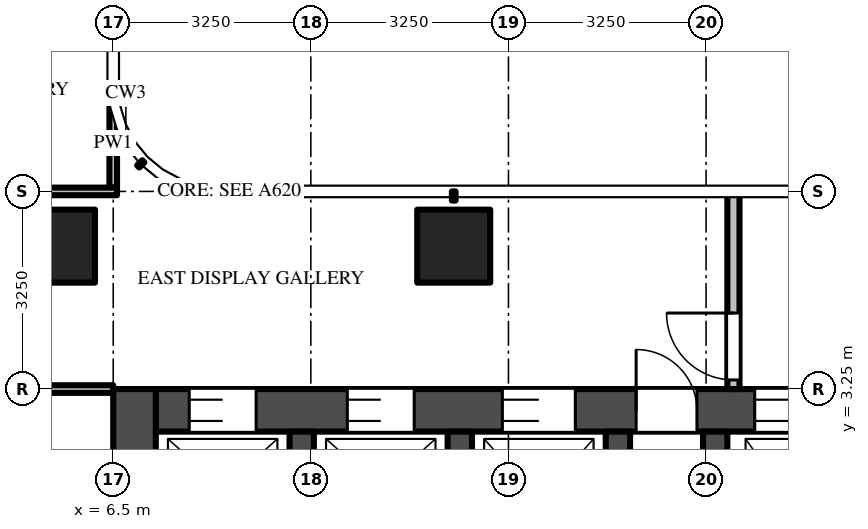
"""IFC4 building model, lengths in metres.
Left out: names, types, materials, properties, quantities, classifications, styles, units other than length and angle.
Written with IfcOpenShell. Run it as: python <this file> out.ifc"""

import sys

from ifc_helpers import new_model, si_unit, direction, frame, frame_2d, origin, origin_2d, place, context, subcontext, project, spatial, rectangle, extrude, source, transform, mapped, element, fill, save


model = new_model("IFC4")
c1 = context("Model", 3, precision=1e-05, world=origin(), true_north=direction((0.0, 1.0)))
c2 = subcontext(c1, "Body", "Model", "MODEL_VIEW")
j1 = project(units=[si_unit("LENGTHUNIT", "METRE"), si_unit("PLANEANGLEUNIT", "RADIAN")], contexts=[c1])
p1 = place(None, origin())
s1 = spatial("IfcSite", under=j1, at=p1, CompositionType="ELEMENT")
p2 = place(p1, origin())
s2 = spatial("IfcBuilding", under=s1, at=p2, CompositionType="ELEMENT")
p3 = place(p2, frame((0.0, 0.0, 169.8)))
s3 = spatial("IfcBuildingStorey", under=s2, at=p3, CompositionType="ELEMENT", Elevation=169.8)
m1 = source(origin(), c2, "Body", "SweptSolid", [
    extrude(rectangle(XDim=1.2, YDim=1.2, at=origin_2d()), origin(), (0.0, 0.0, 1.0), 3.9),
])
for number, where, z_axis, x_axis in (
    (1, (12.1, 5.6, 0.0), (0.0, 0.0, 1.0), (1.0, 0.0, 0.0)),
    (2, (5.6, 5.6, 0.0), (0.0, 0.0, 1.0), (1.0, 0.0, 0.0)),
):
    element("IfcColumn", number, at=place(p3, frame(where, z_axis=z_axis, x_axis=x_axis)), inside=s3, PredefinedType="COLUMN", context=c2, shape_type="MappedRepresentation", body=[
        mapped(m1, transform((0.0, 0.0, 0.0))),
    ])
m2 = source(origin(), c2, "Body", "SweptSolid", [
    extrude(rectangle(XDim=14.85, YDim=0.7, at=frame_2d((7.425, 0.0))), origin(), (0.0, 0.0, 1.0), 3.7),
])
p4 = place(p3, frame((7.2, 2.9, 0.0), z_axis=(0.0, 0.0, 1.0), x_axis=(1.0, 0.0, 0.0)))
e3 = element("IfcWall", 3, at=p4, inside=s3, PredefinedType="SHEAR", context=c2, shape_type="MappedRepresentation", body=[
    mapped(m2, transform((0.0, 0.0, 0.0))),
])
m3 = source(origin(), c2, "Body", "SweptSolid", [
    extrude(rectangle(XDim=1.1, YDim=2.1, at=frame_2d((0.55, 1.05))), frame((0.0, 0.36, 0.0), z_axis=(0.0, -1.0, 0.0), x_axis=(1.0, 0.0, 0.0)), (0.0, 0.0, 1.0), 0.72),
])
p5 = place(p4, frame((0.55, 0.0, 0.0)))
e4 = element("IfcOpeningElement", 4, at=p5, cuts=e3, PredefinedType="OPENING", context=c2, shape_type="MappedRepresentation", body=[
    mapped(m3, transform((0.0, 0.0, 0.0))),
])
p6 = place(p4, frame((3.15, 0.0, 0.0)))
e5 = element("IfcOpeningElement", 5, at=p6, cuts=e3, PredefinedType="OPENING", context=c2, shape_type="MappedRepresentation", body=[
    mapped(m3, transform((0.0, 0.0, 0.0))),
])
m4 = source(origin(), c2, "Body", "SweptSolid", [
    extrude(rectangle(XDim=1.2, YDim=2.1, at=frame_2d((0.6, 1.05))), frame((0.0, 0.36, 0.0), z_axis=(0.0, -1.0, 0.0), x_axis=(1.0, 0.0, 0.0)), (0.0, 0.0, 1.0), 0.72),
])
p7 = place(p4, frame((5.7, 0.0, 0.0)))
e6 = element("IfcOpeningElement", 6, at=p7, cuts=e3, PredefinedType="OPENING", context=c2, shape_type="MappedRepresentation", body=[
    mapped(m4, transform((0.0, 0.0, 0.0))),
])
m5 = source(origin(), c2, "Body", "SweptSolid", [
    extrude(rectangle(XDim=1.3, YDim=2.1, at=frame_2d((0.65, 1.05))), frame((0.0, 0.36, 0.0), z_axis=(0.0, -1.0, 0.0), x_axis=(1.0, 0.0, 0.0)), (0.0, 0.0, 1.0), 0.72),
])
p8 = place(p4, frame((12.2, 0.0, 0.0)))
e7 = element("IfcOpeningElement", 7, at=p8, cuts=e3, PredefinedType="OPENING", context=c2, shape_type="MappedRepresentation", body=[
    mapped(m5, transform((0.0, 0.0, 0.0))),
])
p9 = place(p4, frame((9.85, 0.0, 0.0)))
e8 = element("IfcOpeningElement", 8, at=p9, cuts=e3, PredefinedType="OPENING", context=c2, shape_type="MappedRepresentation", body=[
    mapped(m4, transform((0.0, 0.0, 0.0))),
])
m6 = source(origin(), c2, "Body", "SweptSolid", [
    extrude(rectangle(XDim=1.0, YDim=2.1, at=frame_2d((0.5, 1.05))), frame((0.0, 0.36, 0.0), z_axis=(0.0, -1.0, 0.0), x_axis=(1.0, 0.0, 0.0)), (0.0, 0.0, 1.0), 0.72),
])
p10 = place(p4, frame((7.9, 0.0, 0.0)))
e9 = element("IfcOpeningElement", 9, at=p10, cuts=e3, PredefinedType="OPENING", context=c2, shape_type="MappedRepresentation", body=[
    mapped(m6, transform((0.0, 0.0, 0.0))),
])
m7 = source(origin(), c2, "Body", "SweptSolid", [
    extrude(rectangle(XDim=9.05, YDim=0.7, at=frame_2d((4.525, 0.0))), origin(), (0.0, 0.0, 1.0), 3.7),
])
p11 = place(p3, frame((6.85, -5.8, 0.0), z_axis=(0.0, 0.0, 1.0), x_axis=(0.0, 1.0, 0.0)))
e10 = element("IfcWall", 10, at=p11, inside=s3, PredefinedType="SHEAR", context=c2, shape_type="MappedRepresentation", body=[
    mapped(m7, transform((0.0, 0.0, 0.0))),
])
m8 = source(origin(), c2, "Body", "SweptSolid", [
    extrude(rectangle(XDim=1.8, YDim=2.1, at=frame_2d((0.9, 1.05))), frame((0.0, 0.36, 0.0), z_axis=(0.0, -1.0, 0.0), x_axis=(1.0, 0.0, 0.0)), (0.0, 0.0, 1.0), 0.72),
])
p12 = place(p11, frame((3.15, 0.0, 0.0)))
e11 = element("IfcOpeningElement", 11, at=p12, cuts=e10, PredefinedType="OPENING", context=c2, shape_type="MappedRepresentation", body=[
    mapped(m8, transform((0.0, 0.0, 0.0))),
])
m9 = source(origin(), c2, "Body", "SweptSolid", [
    extrude(rectangle(XDim=2.45, YDim=0.4, at=frame_2d((1.225, 0.0))), origin(), (0.0, 0.0, 1.0), 3.7),
])
for number, where, z_axis, x_axis in (
    (12, (9.6, 0.1, 0.0), (0.0, 0.0, 1.0), (0.0, 1.0, 0.0)),
    (13, (12.2, 0.1, 0.0), (0.0, 0.0, 1.0), (0.0, 1.0, 0.0)),
    (14, (14.8, 0.1, 0.0), (0.0, 0.0, 1.0), (0.0, 1.0, 0.0)),
    (15, (16.4, 0.1, 0.0), (0.0, 0.0, 1.0), (0.0, 1.0, 0.0)),
):
    element("IfcWall", number, at=place(p3, frame(where, z_axis=z_axis, x_axis=x_axis)), inside=s3, PredefinedType="SHEAR", context=c2, shape_type="MappedRepresentation", body=[
        mapped(m9, transform((0.0, 0.0, 0.0))),
    ])
m10 = source(origin(), c2, "Body", "SweptSolid", [
    extrude(rectangle(XDim=3.25, YDim=0.2, at=frame_2d((1.625, 0.0))), origin(), (0.0, 0.0, 1.0), 3.7),
])
p13 = place(p3, frame((16.7, 3.25, 0.0), z_axis=(0.0, 0.0, 1.0), x_axis=(0.0, 1.0, 0.0)))
e16 = element("IfcWall", 16, at=p13, inside=s3, PredefinedType="PARTITIONING", context=c2, shape_type="MappedRepresentation", body=[
    mapped(m10, transform((0.0, 0.0, 0.0))),
])
m11 = source(origin(), c2, "Body", "SweptSolid", [
    extrude(rectangle(XDim=1.1, YDim=2.1, at=frame_2d((0.55, 1.05))), frame((0.0, 0.11, 0.0), z_axis=(0.0, -1.0, 0.0), x_axis=(1.0, 0.0, 0.0)), (0.0, 0.0, 1.0), 0.22),
])
p14 = place(p13, frame((0.15, 0.0, 0.0)))
e17 = element("IfcOpeningElement", 17, at=p14, cuts=e16, PredefinedType="OPENING", context=c2, shape_type="MappedRepresentation", body=[
    mapped(m11, transform((0.0, 0.0, 0.0))),
])
m12 = source(origin(), c2, "Body", "SweptSolid", [
    extrude(rectangle(XDim=1.469, YDim=0.125, at=frame_2d((0.734, 0.0))), origin(), (0.0, 0.0, 1.0), 3.7),
])
p15 = place(p3, frame((6.5, 6.562, 0.0), z_axis=(0.0, 0.0, 1.0), x_axis=(0.0, 1.0, 0.0)))
e18 = element("IfcWall", 18, at=p15, inside=s3, PredefinedType="PARTITIONING", context=c2, shape_type="MappedRepresentation", body=[
    mapped(m12, transform((0.0, 0.0, 0.0))),
])
m13 = source(origin(), c2, "Body", "SweptSolid", [
    extrude(rectangle(XDim=5.363, YDim=0.125, at=frame_2d((2.681, 0.0))), origin(), (0.0, 0.0, 1.0), 2.996),
])
p16 = place(p3, frame((1.137, 3.25, 0.0), z_axis=(0.0, 0.0, 1.0), x_axis=(1.0, 0.0, 0.0)))
e19 = element("IfcWall", 19, at=p16, inside=s3, PredefinedType="PARTITIONING", context=c2, shape_type="MappedRepresentation", body=[
    mapped(m13, transform((0.0, 0.0, 0.0))),
])
m14 = source(origin(), c2, "Body", "SweptSolid", [
    extrude(rectangle(XDim=3.725, YDim=0.125, at=frame_2d((1.863, 0.0))), origin(), (0.0, 0.0, 1.0), 2.78),
])
p17 = place(p3, frame((2.837, 6.5, 0.0), z_axis=(0.0, 0.0, 1.0), x_axis=(1.0, 0.0, 0.0)))
e20 = element("IfcWall", 20, at=p17, inside=s3, PredefinedType="PARTITIONING", context=c2, shape_type="MappedRepresentation", body=[
    mapped(m14, transform((0.0, 0.0, 0.0))),
])
m15 = source(origin(), c2, "Body", "SweptSolid", [
    extrude(rectangle(XDim=1.1, YDim=2.1, at=frame_2d((0.55, 1.05))), frame((0.0, -0.275, 0.0), z_axis=(0.0, -1.0, 0.0), x_axis=(1.0, 0.0, 0.0)), (0.0, 0.0, 1.0), 0.05),
])
p18 = place(p5, origin())
e21 = element("IfcDoor", 21, at=p18, inside=s3, OperationType="DOUBLE_DOOR_SLIDING", PredefinedType="DOOR", context=c2, shape_type="MappedRepresentation", body=[
    mapped(m15, transform((0.0, 0.0, 0.0))),
])
fill(e4, e21)
p19 = place(p6, origin())
e22 = element("IfcDoor", 22, at=p19, inside=s3, OperationType="DOUBLE_DOOR_SLIDING", PredefinedType="DOOR", context=c2, shape_type="MappedRepresentation", body=[
    mapped(m15, transform((0.0, 0.0, 0.0))),
])
fill(e5, e22)
m16 = source(origin(), c2, "Body", "SweptSolid", [
    extrude(rectangle(XDim=1.2, YDim=2.1, at=frame_2d((0.6, 1.05))), frame((0.0, -0.275, 0.0), z_axis=(0.0, -1.0, 0.0), x_axis=(1.0, 0.0, 0.0)), (0.0, 0.0, 1.0), 0.05),
])
p20 = place(p7, origin())
e23 = element("IfcDoor", 23, at=p20, inside=s3, OperationType="DOUBLE_DOOR_SLIDING", PredefinedType="DOOR", context=c2, shape_type="MappedRepresentation", body=[
    mapped(m16, transform((0.0, 0.0, 0.0))),
])
fill(e6, e23)
p21 = place(p9, origin())
e24 = element("IfcDoor", 24, at=p21, inside=s3, OperationType="DOUBLE_DOOR_SLIDING", PredefinedType="DOOR", context=c2, shape_type="MappedRepresentation", body=[
    mapped(m16, transform((0.0, 0.0, 0.0))),
])
fill(e8, e24)
m17 = source(origin(), c2, "Body", "SweptSolid", [
    extrude(rectangle(XDim=1.0, YDim=2.1, at=frame_2d((0.5, 1.05))), frame((0.0, -0.275, 0.0), z_axis=(0.0, -1.0, 0.0), x_axis=(1.0, 0.0, 0.0)), (0.0, 0.0, 1.0), 0.05),
])
p22 = place(p10, origin())
e25 = element("IfcDoor", 25, at=p22, inside=s3, OperationType="SINGLE_SWING_LEFT", PredefinedType="DOOR", context=c2, shape_type="MappedRepresentation", body=[
    mapped(m17, transform((0.0, 0.0, 0.0))),
])
fill(e9, e25)
m18 = source(origin(), c2, "Body", "SweptSolid", [
    extrude(rectangle(XDim=1.1, YDim=2.1, at=frame_2d((0.55, 1.05))), frame((0.0, 0.025, 0.0), z_axis=(0.0, -1.0, 0.0), x_axis=(1.0, 0.0, 0.0)), (0.0, 0.0, 1.0), 0.05),
])
p23 = place(p14, origin())
e26 = element("IfcDoor", 26, at=p23, inside=s3, OperationType="SINGLE_SWING_RIGHT", PredefinedType="DOOR", context=c2, shape_type="MappedRepresentation", body=[
    mapped(m18, transform((0.0, 0.0, 0.0))),
])
fill(e17, e26)
save(model, sys.argv[1])
